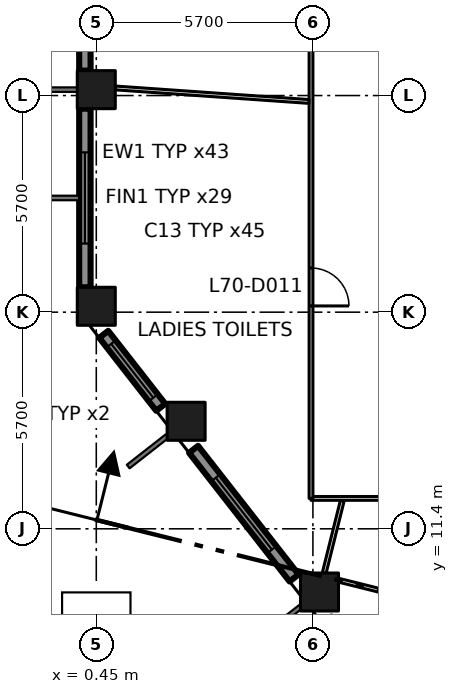
"""IFC4 building model, lengths in metres.
Left out: names, types, materials, properties, quantities, classifications, styles, units other than length and angle.
Written with IfcOpenShell. Run it as: python <this file> out.ifc"""

import sys

from ifc_helpers import new_model, si_unit, direction, frame, frame_2d, origin, origin_2d, place, context, subcontext, project, spatial, rectangle, extrude, element, fill, save


model = new_model("IFC4")
c1 = context("Model", 3, precision=1e-05, world=origin(), true_north=direction((0.0, 1.0)))
c2 = subcontext(c1, "Body", "Model", "MODEL_VIEW")
j1 = project(units=[si_unit("LENGTHUNIT", "METRE"), si_unit("PLANEANGLEUNIT", "RADIAN")], contexts=[c1])
p1 = place(None, origin())
s1 = spatial("IfcSite", under=j1, at=p1, CompositionType="ELEMENT")
p2 = place(p1, origin())
s2 = spatial("IfcBuilding", under=s1, at=p2, CompositionType="ELEMENT")
p3 = place(p2, frame((0.0, 0.0, 306.6)))
s3 = spatial("IfcBuildingStorey", under=s2, at=p3, CompositionType="ELEMENT", Elevation=306.6)
for number, where, z_axis, x_axis in (
    (1, (0.45, 17.255, 0.0), (0.0, 0.0, 1.0), (1.0, 0.0, 0.0)),
    (2, (0.45, 22.955, 0.0), (0.0, 0.0, 1.0), (1.0, 0.0, 0.0)),
    (3, (6.323, 9.737, 0.0), (0.0, 0.0, 1.0), (1.0, 0.0, 0.0)),
    (4, (2.814, 14.229, 0.0), (0.0, 0.0, 1.0), (1.0, 0.0, 0.0)),
):
    element("IfcColumn", number, at=place(p3, frame(where, z_axis=z_axis, x_axis=x_axis)), inside=s3, PredefinedType="COLUMN", context=c2, shape_type="SweptSolid", body=[
        extrude(rectangle(XDim=1.0, YDim=1.0, at=origin_2d()), origin(), (0.0, 0.0, 1.0), 4.2),
    ])
p4 = place(p3, frame((0.15, 28.155, 0.0), z_axis=(0.0, 0.0, 1.0), x_axis=(0.0, -1.0, 0.0)))
e5 = element("IfcWall", 5, at=p4, inside=s3, PredefinedType="SOLIDWALL", context=c2, shape_type="SweptSolid", body=[
    extrude(rectangle(XDim=4.7, YDim=0.3, at=frame_2d((2.35, 0.0))), origin(), (0.0, 0.0, 1.0), 3.2),
])
p5 = place(p4, frame((1.15, 0.0, 0.8)))
e6 = element("IfcOpeningElement", 6, at=p5, cuts=e5, PredefinedType="OPENING", context=c2, shape_type="SweptSolid", body=[
    extrude(rectangle(XDim=2.4, YDim=2.1, at=frame_2d((1.2, 1.05))), frame((0.0, 0.16, 0.0), z_axis=(0.0, -1.0, 0.0), x_axis=(1.0, 0.0, 0.0)), (0.0, 0.0, 1.0), 0.32),
])
p6 = place(p3, frame((0.15, 22.455, 0.0), z_axis=(0.0, 0.0, 1.0), x_axis=(0.0, -1.0, 0.0)))
e7 = element("IfcWall", 7, at=p6, inside=s3, PredefinedType="SOLIDWALL", context=c2, shape_type="SweptSolid", body=[
    extrude(rectangle(XDim=4.7, YDim=0.3, at=frame_2d((2.35, 0.0))), origin(), (0.0, 0.0, 1.0), 3.2),
])
p7 = place(p6, frame((1.15, 0.0, 0.8)))
e8 = element("IfcOpeningElement", 8, at=p7, cuts=e7, PredefinedType="OPENING", context=c2, shape_type="SweptSolid", body=[
    extrude(rectangle(XDim=2.4, YDim=2.1, at=frame_2d((1.2, 1.05))), frame((0.0, 0.16, 0.0), z_axis=(0.0, -1.0, 0.0), x_axis=(1.0, 0.0, 0.0)), (0.0, 0.0, 1.0), 0.32),
])
p8 = place(p3, frame((0.646, 16.517, 0.0), z_axis=(0.0, 0.0, 1.0), x_axis=(0.615610986717, -0.788050197026, 0.0)))
e9 = element("IfcWall", 9, at=p8, inside=s3, PredefinedType="SOLIDWALL", context=c2, shape_type="SweptSolid", body=[
    extrude(rectangle(XDim=2.437, YDim=0.3, at=frame_2d((1.218, 0.0))), origin(), (0.0, 0.0, 1.0), 3.2),
])
p9 = place(p8, frame((0.318, 0.0, 0.8)))
e10 = element("IfcOpeningElement", 10, at=p9, cuts=e9, PredefinedType="OPENING", context=c2, shape_type="SweptSolid", body=[
    extrude(rectangle(XDim=1.8, YDim=2.1, at=frame_2d((0.9, 1.05))), frame((0.0, 0.16, 0.0), z_axis=(0.0, -1.0, 0.0), x_axis=(1.0, 0.0, 0.0)), (0.0, 0.0, 1.0), 0.32),
])
p10 = place(p3, frame((3.01, 13.491, 0.0), z_axis=(0.0, 0.0, 1.0), x_axis=(0.615713519567, -0.787970089421, 0.0)))
e11 = element("IfcWall", 11, at=p10, inside=s3, PredefinedType="SOLIDWALL", context=c2, shape_type="SweptSolid", body=[
    extrude(rectangle(XDim=4.296, YDim=0.3, at=frame_2d((2.148, 0.0))), origin(), (0.0, 0.0, 1.0), 3.2),
])
p11 = place(p10, frame((0.948, 0.0, 0.8)))
e12 = element("IfcOpeningElement", 12, at=p11, cuts=e11, PredefinedType="OPENING", context=c2, shape_type="SweptSolid", body=[
    extrude(rectangle(XDim=2.4, YDim=2.1, at=frame_2d((1.2, 1.05))), frame((0.0, 0.16, 0.0), z_axis=(0.0, -1.0, 0.0), x_axis=(1.0, 0.0, 0.0)), (0.0, 0.0, 1.0), 0.32),
])
p12 = place(p3, frame((6.1, 12.2, 0.0), z_axis=(0.0, 0.0, 1.0), x_axis=(1.0, 0.0, 0.0)))
e13 = element("IfcWall", 13, at=p12, inside=s3, PredefinedType="PARTITIONING", context=c2, shape_type="SweptSolid", body=[
    extrude(rectangle(XDim=3.8, YDim=0.1, at=frame_2d((1.9, 0.0))), origin(), (0.0, 0.0, 1.0), 3.9),
])
p13 = place(p3, frame((6.1, 38.9, 0.0), z_axis=(0.0, 0.0, 1.0), x_axis=(0.0, -1.0, 0.0)))
e14 = element("IfcWall", 14, at=p13, inside=s3, PredefinedType="PARTITIONING", context=c2, shape_type="SweptSolid", body=[
    extrude(rectangle(XDim=26.7, YDim=0.1, at=frame_2d((13.35, 0.0))), origin(), (0.0, 0.0, 1.0), 3.9),
])
p14 = place(p13, frame((20.636, 0.0, 0.0)))
e15 = element("IfcOpeningElement", 15, at=p14, cuts=e14, PredefinedType="OPENING", context=c2, shape_type="SweptSolid", body=[
    extrude(rectangle(XDim=1.0, YDim=2.1, at=frame_2d((0.5, 1.05))), frame((0.0, 0.06, 0.0), z_axis=(0.0, -1.0, 0.0), x_axis=(1.0, 0.0, 0.0)), (0.0, 0.0, 1.0), 0.12),
])
p15 = place(p13, frame((6.88, 0.0, 0.0)))
e16 = element("IfcOpeningElement", 16, at=p15, cuts=e14, PredefinedType="OPENING", context=c2, shape_type="SweptSolid", body=[
    extrude(rectangle(XDim=1.8, YDim=2.1, at=frame_2d((0.9, 1.05))), frame((0.0, 0.06, 0.0), z_axis=(0.0, -1.0, 0.0), x_axis=(1.0, 0.0, 0.0)), (0.0, 0.0, 1.0), 0.12),
])
p16 = place(p3, frame((6.047, 22.644, 0.0), z_axis=(0.0, 0.0, 1.0), x_axis=(-0.997570469691, 0.069664610825, 0.0)))
e17 = element("IfcWall", 17, at=p16, inside=s3, PredefinedType="PARTITIONING", context=c2, shape_type="SweptSolid", body=[
    extrude(rectangle(XDim=5.11, YDim=0.1, at=frame_2d((2.555, 0.0))), origin(), (0.0, 0.0, 1.0), 3.9),
])
p17 = place(p3, frame((6.922, 12.138, 0.0), z_axis=(0.0, 0.0, 1.0), x_axis=(-0.242476987996, -0.970157157523, 0.0)))
e18 = element("IfcWall", 18, at=p17, inside=s3, PredefinedType="PARTITIONING", context=c2, shape_type="SweptSolid", body=[
    extrude(rectangle(XDim=1.959, YDim=0.1, at=frame_2d((0.98, 0.0))), origin(), (0.0, 0.0, 1.0), 3.9),
])
p18 = place(p3, frame((8.72, 9.575, 0.0), z_axis=(0.0, 0.0, 1.0), x_axis=(-0.970274576003, 0.242006708918, 0.0)))
e19 = element("IfcWall", 19, at=p18, inside=s3, PredefinedType="PARTITIONING", context=c2, shape_type="SweptSolid", body=[
    extrude(rectangle(XDim=1.955, YDim=0.1, at=frame_2d((0.978, 0.0))), origin(), (0.0, 0.0, 1.0), 3.9),
])
p19 = place(p7, origin())
e20 = element("IfcWindow", 20, at=p19, inside=s3, PartitioningType="DOUBLE_PANEL_VERTICAL", PredefinedType="WINDOW", context=c2, shape_type="SweptSolid", body=[
    extrude(rectangle(XDim=2.4, YDim=2.1, at=frame_2d((1.2, 1.05))), frame((0.0, 0.03, 0.0), z_axis=(0.0, -1.0, 0.0), x_axis=(1.0, 0.0, 0.0)), (0.0, 0.0, 1.0), 0.06),
])
fill(e8, e20)
p20 = place(p9, origin())
e21 = element("IfcWindow", 21, at=p20, inside=s3, PartitioningType="DOUBLE_PANEL_VERTICAL", PredefinedType="WINDOW", context=c2, shape_type="SweptSolid", body=[
    extrude(rectangle(XDim=1.8, YDim=2.1, at=frame_2d((0.9, 1.05))), frame((0.0, 0.03, 0.0), z_axis=(0.0, -1.0, 0.0), x_axis=(1.0, 0.0, 0.0)), (0.0, 0.0, 1.0), 0.06),
])
fill(e10, e21)
p21 = place(p11, origin())
e22 = element("IfcWindow", 22, at=p21, inside=s3, PartitioningType="DOUBLE_PANEL_VERTICAL", PredefinedType="WINDOW", context=c2, shape_type="SweptSolid", body=[
    extrude(rectangle(XDim=2.4, YDim=2.1, at=frame_2d((1.2, 1.05))), frame((0.0, 0.03, 0.0), z_axis=(0.0, -1.0, 0.0), x_axis=(1.0, 0.0, 0.0)), (0.0, 0.0, 1.0), 0.06),
])
fill(e12, e22)
p22 = place(p14, origin())
e23 = element("IfcDoor", 23, at=p22, inside=s3, OperationType="SINGLE_SWING_RIGHT", PredefinedType="DOOR", context=c2, shape_type="SweptSolid", body=[
    extrude(rectangle(XDim=1.0, YDim=2.1, at=frame_2d((0.5, 1.05))), frame((0.0, 0.025, 0.0), z_axis=(0.0, -1.0, 0.0), x_axis=(1.0, 0.0, 0.0)), (0.0, 0.0, 1.0), 0.05),
])
fill(e15, e23)
save(model, sys.argv[1])
